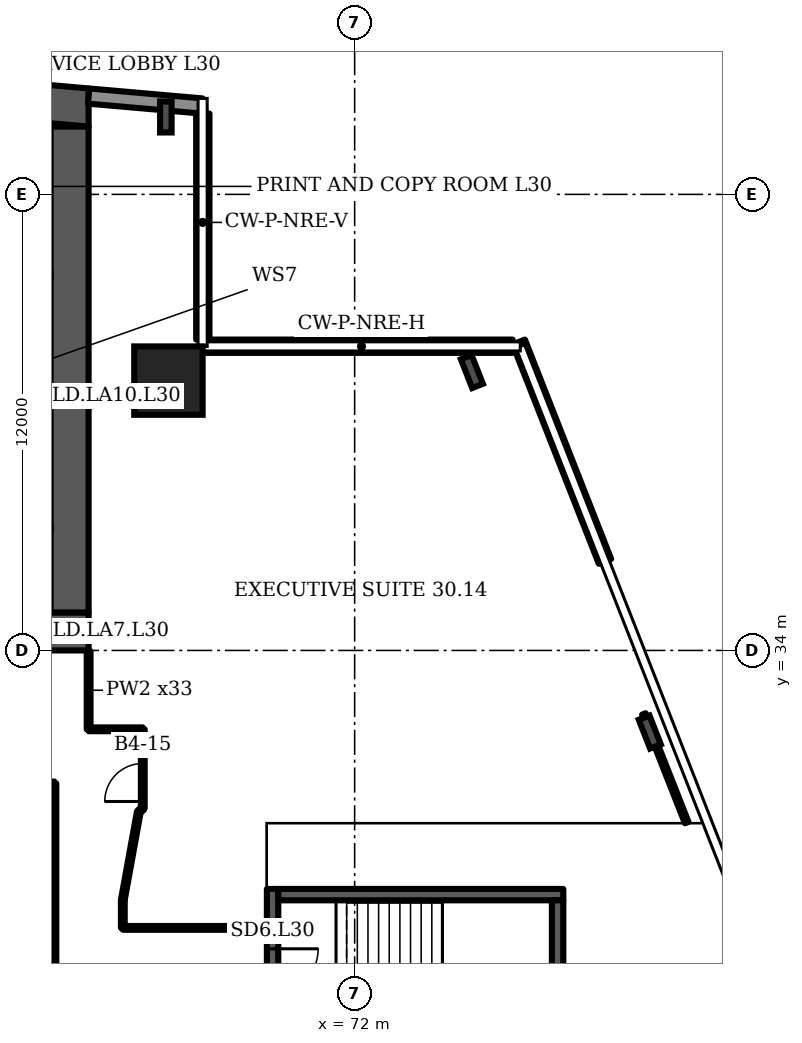
"""IFC4 building model, lengths in metres.
Left out: names, types, materials, properties, quantities, classifications, styles, units other than length and angle.
Written with IfcOpenShell. Run it as: python <this file> out.ifc"""

import sys

from ifc_helpers import new_model, si_unit, direction, frame, frame_2d, origin, origin_2d, place, context, subcontext, project, spatial, polyline, rectangle, i_section, outline, extrude, element, fill, save


model = new_model("IFC4")
c1 = context("Model", 3, precision=1e-05, world=origin(), true_north=direction((0.0, 1.0)))
c2 = subcontext(c1, "Body", "Model", "MODEL_VIEW")
j1 = project(units=[si_unit("LENGTHUNIT", "METRE"), si_unit("PLANEANGLEUNIT", "RADIAN")], contexts=[c1])
p1 = place(None, origin())
s1 = spatial("IfcSite", under=j1, at=p1, CompositionType="ELEMENT")
p2 = place(p1, origin())
s2 = spatial("IfcBuilding", under=s1, at=p2, CompositionType="ELEMENT")
p3 = place(p2, frame((0.0, 0.0, 129.1)))
s3 = spatial("IfcBuildingStorey", under=s2, at=p3, CompositionType="ELEMENT", Elevation=129.1)
p4 = place(p3, frame((0.0, 0.0, -0.0)))
e1 = element("IfcWall", 1, at=p4, inside=s3, PredefinedType="SHEAR", context=c2, shape_type="SweptSolid", body=[
    extrude(outline(polyline([(16.0, 47.784), (40.5, 49.927), (65.0, 47.784), (65.0, 48.787), (40.5, 50.931), (16.0, 48.787), (16.0, 47.784)])), origin(), (0.0, 0.0, 1.0), 3.6),
])
p5 = place(p3, frame((16.0, 34.5, 0.0), z_axis=(0.0, 0.0, 1.0), x_axis=(1.0, 0.0, 0.0)))
e2 = element("IfcWall", 2, at=p5, inside=s3, PredefinedType="SHEAR", context=c2, shape_type="SweptSolid", body=[
    extrude(rectangle(XDim=49.0, YDim=1.0, at=frame_2d((24.5, 0.0))), origin(), (0.0, 0.0, 1.0), 3.6),
])
p6 = place(p5, frame((1.2, 0.0, 0.0)))
e3 = element("IfcOpeningElement", 3, at=p6, cuts=e2, PredefinedType="OPENING", context=c2, shape_type="SweptSolid", body=[
    extrude(rectangle(XDim=1.1, YDim=2.1, at=frame_2d((0.55, 1.05))), frame((0.0, 0.51, 0.0), z_axis=(0.0, -1.0, 0.0), x_axis=(1.0, 0.0, 0.0)), (0.0, 0.0, 1.0), 1.02),
])
p7 = place(p5, frame((5.083, 0.0, 0.0)))
e4 = element("IfcOpeningElement", 4, at=p7, cuts=e2, PredefinedType="OPENING", context=c2, shape_type="SweptSolid", body=[
    extrude(rectangle(XDim=1.1, YDim=2.1, at=frame_2d((0.55, 1.05))), frame((0.0, 0.51, 0.0), z_axis=(0.0, -1.0, 0.0), x_axis=(1.0, 0.0, 0.0)), (0.0, 0.0, 1.0), 1.02),
])
p8 = place(p5, frame((2.933, 0.0, 0.0)))
e5 = element("IfcOpeningElement", 5, at=p8, cuts=e2, PredefinedType="OPENING", context=c2, shape_type="SweptSolid", body=[
    extrude(rectangle(XDim=1.4, YDim=2.1, at=frame_2d((0.7, 1.05))), frame((0.0, 0.51, 0.0), z_axis=(0.0, -1.0, 0.0), x_axis=(1.0, 0.0, 0.0)), (0.0, 0.0, 1.0), 1.02),
])
p9 = place(p5, frame((7.65, 0.0, 0.0)))
e6 = element("IfcOpeningElement", 6, at=p9, cuts=e2, PredefinedType="OPENING", context=c2, shape_type="SweptSolid", body=[
    extrude(rectangle(XDim=1.2, YDim=2.1, at=frame_2d((0.6, 1.05))), frame((0.0, 0.51, 0.0), z_axis=(0.0, -1.0, 0.0), x_axis=(1.0, 0.0, 0.0)), (0.0, 0.0, 1.0), 1.02),
])
p10 = place(p5, frame((14.817, 0.0, 0.0)))
e7 = element("IfcOpeningElement", 7, at=p10, cuts=e2, PredefinedType="OPENING", context=c2, shape_type="SweptSolid", body=[
    extrude(rectangle(XDim=1.1, YDim=2.1, at=frame_2d((0.55, 1.05))), frame((0.0, 0.51, 0.0), z_axis=(0.0, -1.0, 0.0), x_axis=(1.0, 0.0, 0.0)), (0.0, 0.0, 1.0), 1.02),
])
p11 = place(p5, frame((19.083, 0.0, 0.0)))
e8 = element("IfcOpeningElement", 8, at=p11, cuts=e2, PredefinedType="OPENING", context=c2, shape_type="SweptSolid", body=[
    extrude(rectangle(XDim=1.1, YDim=2.1, at=frame_2d((0.55, 1.05))), frame((0.0, 0.51, 0.0), z_axis=(0.0, -1.0, 0.0), x_axis=(1.0, 0.0, 0.0)), (0.0, 0.0, 1.0), 1.02),
])
p12 = place(p5, frame((16.8, 0.0, 0.0)))
e9 = element("IfcOpeningElement", 9, at=p12, cuts=e2, PredefinedType="OPENING", context=c2, shape_type="SweptSolid", body=[
    extrude(rectangle(XDim=1.4, YDim=2.1, at=frame_2d((0.7, 1.05))), frame((0.0, 0.51, 0.0), z_axis=(0.0, -1.0, 0.0), x_axis=(1.0, 0.0, 0.0)), (0.0, 0.0, 1.0), 1.02),
])
p13 = place(p5, frame((21.817, 0.0, 0.0)))
e10 = element("IfcOpeningElement", 10, at=p13, cuts=e2, PredefinedType="OPENING", context=c2, shape_type="SweptSolid", body=[
    extrude(rectangle(XDim=1.1, YDim=2.1, at=frame_2d((0.55, 1.05))), frame((0.0, 0.51, 0.0), z_axis=(0.0, -1.0, 0.0), x_axis=(1.0, 0.0, 0.0)), (0.0, 0.0, 1.0), 1.02),
])
p14 = place(p5, frame((26.083, 0.0, 0.0)))
e11 = element("IfcOpeningElement", 11, at=p14, cuts=e2, PredefinedType="OPENING", context=c2, shape_type="SweptSolid", body=[
    extrude(rectangle(XDim=1.1, YDim=2.1, at=frame_2d((0.55, 1.05))), frame((0.0, 0.51, 0.0), z_axis=(0.0, -1.0, 0.0), x_axis=(1.0, 0.0, 0.0)), (0.0, 0.0, 1.0), 1.02),
])
p15 = place(p5, frame((33.15, 0.0, 0.0)))
e12 = element("IfcOpeningElement", 12, at=p15, cuts=e2, PredefinedType="OPENING", context=c2, shape_type="SweptSolid", body=[
    extrude(rectangle(XDim=1.2, YDim=2.1, at=frame_2d((0.6, 1.05))), frame((0.0, 0.51, 0.0), z_axis=(0.0, -1.0, 0.0), x_axis=(1.0, 0.0, 0.0)), (0.0, 0.0, 1.0), 1.02),
])
p16 = place(p5, frame((37.8, 0.0, 0.0)))
e13 = element("IfcOpeningElement", 13, at=p16, cuts=e2, PredefinedType="OPENING", context=c2, shape_type="SweptSolid", body=[
    extrude(rectangle(XDim=1.4, YDim=2.1, at=frame_2d((0.7, 1.05))), frame((0.0, 0.51, 0.0), z_axis=(0.0, -1.0, 0.0), x_axis=(1.0, 0.0, 0.0)), (0.0, 0.0, 1.0), 1.02),
])
p17 = place(p5, frame((42.817, 0.0, 0.0)))
e14 = element("IfcOpeningElement", 14, at=p17, cuts=e2, PredefinedType="OPENING", context=c2, shape_type="SweptSolid", body=[
    extrude(rectangle(XDim=1.1, YDim=2.1, at=frame_2d((0.55, 1.05))), frame((0.0, 0.51, 0.0), z_axis=(0.0, -1.0, 0.0), x_axis=(1.0, 0.0, 0.0)), (0.0, 0.0, 1.0), 1.02),
])
p18 = place(p5, frame((46.7, 0.0, 0.0)))
e15 = element("IfcOpeningElement", 15, at=p18, cuts=e2, PredefinedType="OPENING", context=c2, shape_type="SweptSolid", body=[
    extrude(rectangle(XDim=1.1, YDim=2.1, at=frame_2d((0.55, 1.05))), frame((0.0, 0.51, 0.0), z_axis=(0.0, -1.0, 0.0), x_axis=(1.0, 0.0, 0.0)), (0.0, 0.0, 1.0), 1.02),
])
p19 = place(p5, frame((44.667, 0.0, 0.0)))
e16 = element("IfcOpeningElement", 16, at=p19, cuts=e2, PredefinedType="OPENING", context=c2, shape_type="SweptSolid", body=[
    extrude(rectangle(XDim=1.4, YDim=2.1, at=frame_2d((0.7, 1.05))), frame((0.0, 0.51, 0.0), z_axis=(0.0, -1.0, 0.0), x_axis=(1.0, 0.0, 0.0)), (0.0, 0.0, 1.0), 1.02),
])
p20 = place(p3, frame((64.5, 35.0, 0.0), z_axis=(0.0, 0.0, 1.0), x_axis=(0.0, 1.0, 0.0)))
e17 = element("IfcWall", 17, at=p20, inside=s3, PredefinedType="SHEAR", context=c2, shape_type="SweptSolid", body=[
    extrude(rectangle(XDim=12.784, YDim=1.0, at=frame_2d((6.392, 0.0))), origin(), (0.0, 0.0, 1.0), 3.6),
])
p21 = place(p3, frame((67.1, 41.1, 0.0), z_axis=(0.0, 0.0, 1.0), x_axis=(1.0, 0.0, 0.0)))
e18 = element("IfcColumn", 18, at=p21, inside=s3, PredefinedType="COLUMN", context=c2, shape_type="SweptSolid", body=[
    extrude(rectangle(XDim=1.8, YDim=1.8, at=origin_2d()), origin(), (0.0, 0.0, 1.0), 3.6),
])
for number, where, z_axis, x_axis in (
    (19, (79.766, 31.853, 0.0), (0.0, 0.0, 1.0), (0.931, 0.366, 0.0)),
    (20, (75.085, 41.338, 0.0), (0.0, 0.0, 1.0), (0.931, 0.366, 0.0)),
    (21, (67.032, 48.036, 0.0), (0.0, 0.0, 1.0), (1.0, 0.0, 0.0)),
):
    element("IfcColumn", number, at=place(p3, frame(where, z_axis=z_axis, x_axis=x_axis)), inside=s3, PredefinedType="COLUMN", context=c2, shape_type="SweptSolid", body=[
        extrude(i_section(OverallWidth=0.303, OverallDepth=0.814, WebThickness=0.021, FlangeThickness=0.04, FilletRadius=0.03, at=origin_2d()), origin(), (0.0, 0.0, 1.0), 3.6),
    ])
p22 = place(p3, frame((67.983, 48.326, 0.0), z_axis=(0.0, 0.0, 1.0), x_axis=(-0.996194, 0.087168, 0.0)))
e22 = element("IfcWall", 22, at=p22, inside=s3, PredefinedType="SOLIDWALL", context=c2, shape_type="SweptSolid", body=[
    extrude(rectangle(XDim=2.994, YDim=0.4, at=frame_2d((1.497, 0.0))), origin(), (0.0, 0.0, 1.0), 3.2),
])
p23 = place(p3, frame((78.586, 36.344, 0.0), z_axis=(0.0, 0.0, 1.0), x_axis=(-0.365792, 0.930699, 0.0)))
e23 = element("IfcWall", 23, at=p23, inside=s3, PredefinedType="SOLIDWALL", context=c2, shape_type="SweptSolid", body=[
    extrude(rectangle(XDim=6.202, YDim=0.35, at=frame_2d((3.101, 0.0))), origin(), (0.0, 0.0, 1.0), 1.0),
])
p24 = place(p3, frame((76.155, 42.005, 0.0), z_axis=(0.0, 0.0, 1.0), x_axis=(-1.0, 0.0, 0.0)))
e24 = element("IfcWall", 24, at=p24, inside=s3, PredefinedType="SOLIDWALL", context=c2, shape_type="SweptSolid", body=[
    extrude(rectangle(XDim=8.155, YDim=0.35, at=frame_2d((4.078, 0.0))), origin(), (0.0, 0.0, 1.0), 1.0),
])
p25 = place(p3, frame((68.005, 42.18, 0.0), z_axis=(0.0, 0.0, 1.0), x_axis=(0.0, 1.0, 0.0)))
e25 = element("IfcWall", 25, at=p25, inside=s3, PredefinedType="SOLIDWALL", context=c2, shape_type="SweptSolid", body=[
    extrude(rectangle(XDim=5.947, YDim=0.35, at=frame_2d((2.973, 0.0))), origin(), (0.0, 0.0, 1.0), 1.0),
])
p26 = place(p3, frame((69.84, 23.375, 0.0), z_axis=(0.0, 0.0, 1.0), x_axis=(0.0, 1.0, 0.0)))
e26 = element("IfcWall", 26, at=p26, inside=s3, PredefinedType="SHEAR", context=c2, shape_type="SweptSolid", body=[
    extrude(rectangle(XDim=4.35, YDim=0.3, at=frame_2d((2.175, 0.0))), origin(), (0.0, 0.0, 1.0), 3.2),
])
p27 = place(p26, frame((1.575, 0.0, 0.0)))
e27 = element("IfcOpeningElement", 27, at=p27, cuts=e26, PredefinedType="OPENING", context=c2, shape_type="SweptSolid", body=[
    extrude(rectangle(XDim=1.2, YDim=2.1, at=frame_2d((0.6, 1.05))), frame((0.0, 0.16, 0.0), z_axis=(0.0, -1.0, 0.0), x_axis=(1.0, 0.0, 0.0)), (0.0, 0.0, 1.0), 0.32),
])
p28 = place(p3, frame((44.51, 30.5, 0.0), z_axis=(0.0, 0.0, 1.0), x_axis=(1.0, 0.0, 0.0)))
e28 = element("IfcWall", 28, at=p28, inside=s3, PredefinedType="PARTITIONING", context=c2, shape_type="SweptSolid", body=[
    extrude(rectangle(XDim=19.59, YDim=0.1, at=frame_2d((9.795, 0.0))), origin(), (0.0, 0.0, 1.0), 3.2),
])
p29 = place(p28, frame((6.41, 0.0, 0.0)))
e29 = element("IfcOpeningElement", 29, at=p29, cuts=e28, PredefinedType="OPENING", context=c2, shape_type="SweptSolid", body=[
    extrude(rectangle(XDim=1.0, YDim=2.1, at=frame_2d((0.5, 1.05))), frame((0.0, 0.06, 0.0), z_axis=(0.0, -1.0, 0.0), x_axis=(1.0, 0.0, 0.0)), (0.0, 0.0, 1.0), 0.12),
])
p30 = place(p28, frame((10.41, 0.0, 0.0)))
e30 = element("IfcOpeningElement", 30, at=p30, cuts=e28, PredefinedType="OPENING", context=c2, shape_type="SweptSolid", body=[
    extrude(rectangle(XDim=1.0, YDim=2.1, at=frame_2d((0.5, 1.05))), frame((0.0, 0.06, 0.0), z_axis=(0.0, -1.0, 0.0), x_axis=(1.0, 0.0, 0.0)), (0.0, 0.0, 1.0), 0.12),
])
p31 = place(p3, frame((64.1, 10.095, 0.0), z_axis=(0.0, 0.0, 1.0), x_axis=(0.0, 1.0, 0.0)))
e31 = element("IfcWall", 31, at=p31, inside=s3, PredefinedType="PARTITIONING", context=c2, shape_type="SweptSolid", body=[
    extrude(rectangle(XDim=20.405, YDim=0.1, at=frame_2d((10.203, 0.0))), origin(), (0.0, 0.0, 1.0), 3.2),
])
p32 = place(p31, frame((8.905, 0.0, 0.0)))
e32 = element("IfcOpeningElement", 32, at=p32, cuts=e31, PredefinedType="OPENING", context=c2, shape_type="SweptSolid", body=[
    extrude(rectangle(XDim=1.0, YDim=2.1, at=frame_2d((0.5, 1.05))), frame((0.0, 0.06, 0.0), z_axis=(0.0, -1.0, 0.0), x_axis=(1.0, 0.0, 0.0)), (0.0, 0.0, 1.0), 0.12),
])
p33 = place(p3, frame((65.0, 31.925, 0.0), z_axis=(0.0, 0.0, 1.0), x_axis=(0.0, 1.0, 0.0)))
e33 = element("IfcWall", 33, at=p33, inside=s3, PredefinedType="PARTITIONING", context=c2, shape_type="SweptSolid", body=[
    extrude(rectangle(XDim=2.055, YDim=0.1, at=frame_2d((1.027, 0.0))), origin(), (0.0, 0.0, 1.0), 3.2),
])
p34 = place(p3, frame((65.0, 31.925, 0.0), z_axis=(0.0, 0.0, 1.0), x_axis=(1.0, 0.0, 0.0)))
e34 = element("IfcWall", 34, at=p34, inside=s3, PredefinedType="PARTITIONING", context=c2, shape_type="SweptSolid", body=[
    extrude(rectangle(XDim=1.425, YDim=0.1, at=frame_2d((0.712, 0.0))), origin(), (0.0, 0.0, 1.0), 3.2),
])
p35 = place(p3, frame((65.9, 26.7, 0.0), z_axis=(0.0, 0.0, 1.0), x_axis=(0.0, 1.0, 0.0)))
e35 = element("IfcWall", 35, at=p35, inside=s3, PredefinedType="PARTITIONING", context=c2, shape_type="SweptSolid", body=[
    extrude(rectangle(XDim=0.735, YDim=0.1, at=frame_2d((0.368, 0.0))), origin(), (0.0, 0.0, 1.0), 3.2),
])
p36 = place(p3, frame((65.9, 26.7, 0.0), z_axis=(0.0, 0.0, 1.0), x_axis=(1.0, 0.0, 0.0)))
e36 = element("IfcWall", 36, at=p36, inside=s3, PredefinedType="PARTITIONING", context=c2, shape_type="SweptSolid", body=[
    extrude(rectangle(XDim=3.771, YDim=0.1, at=frame_2d((1.885, 0.0))), origin(), (0.0, 0.0, 1.0), 3.2),
])
p37 = place(p3, frame((65.9, 27.435, 0.0), z_axis=(0.0, 0.0, 1.0), x_axis=(0.178584, 0.983924, 0.0)))
e37 = element("IfcWall", 37, at=p37, inside=s3, PredefinedType="PARTITIONING", context=c2, shape_type="SweptSolid", body=[
    extrude(rectangle(XDim=2.353, YDim=0.1, at=frame_2d((1.176, 0.0))), origin(), (0.0, 0.0, 1.0), 3.2),
])
p38 = place(p3, frame((66.32, 29.75, 0.0), z_axis=(0.0, 0.0, 1.0), x_axis=(0.741581, 0.670872, 0.0)))
e38 = element("IfcWall", 38, at=p38, inside=s3, PredefinedType="PARTITIONING", context=c2, shape_type="SweptSolid", body=[
    extrude(rectangle(XDim=0.142, YDim=0.1, at=frame_2d((0.071, 0.0))), origin(), (0.0, 0.0, 1.0), 3.2),
])
p39 = place(p3, frame((66.425, 29.845, 0.0), z_axis=(0.0, 0.0, 1.0), x_axis=(0.0, 1.0, 0.0)))
e39 = element("IfcWall", 39, at=p39, inside=s3, PredefinedType="PARTITIONING", context=c2, shape_type="SweptSolid", body=[
    extrude(rectangle(XDim=2.08, YDim=0.1, at=frame_2d((1.04, 0.0))), origin(), (0.0, 0.0, 1.0), 3.2),
])
p40 = place(p39, frame((0.181, 0.0, 0.0)))
e40 = element("IfcOpeningElement", 40, at=p40, cuts=e39, PredefinedType="OPENING", context=c2, shape_type="SweptSolid", body=[
    extrude(rectangle(XDim=1.0, YDim=2.1, at=frame_2d((0.5, 1.05))), frame((0.0, 0.06, 0.0), z_axis=(0.0, -1.0, 0.0), x_axis=(1.0, 0.0, 0.0)), (0.0, 0.0, 1.0), 0.12),
])
p41 = place(p3, frame((80.737, 29.47, 0.0), z_axis=(0.0, 0.0, 1.0), x_axis=(-0.366592, 0.930378, 0.0)))
e41 = element("IfcWall", 41, at=p41, inside=s3, PredefinedType="PARTITIONING", context=c2, shape_type="SweptSolid", body=[
    extrude(rectangle(XDim=3.074, YDim=0.1, at=frame_2d((1.537, 0.0))), origin(), (0.0, 0.0, 1.0), 2.58),
])
p42 = place(p3, frame((69.99, 27.575, 0.0), z_axis=(0.0, 0.0, 1.0), x_axis=(1.0, 0.0, 0.0)))
e42 = element("IfcWall", 42, at=p42, inside=s3, PredefinedType="SHEAR", context=c2, shape_type="SweptSolid", body=[
    extrude(rectangle(XDim=7.5, YDim=0.3, at=frame_2d((3.75, 0.0))), origin(), (0.0, 0.0, 1.0), 3.2),
])
p43 = place(p3, frame((77.34, 23.675, 0.0), z_axis=(0.0, 0.0, 1.0), x_axis=(0.0, 1.0, 0.0)))
e43 = element("IfcWall", 43, at=p43, inside=s3, PredefinedType="SHEAR", context=c2, shape_type="SweptSolid", body=[
    extrude(rectangle(XDim=3.75, YDim=0.3, at=frame_2d((1.875, 0.0))), origin(), (0.0, 0.0, 1.0), 3.2),
])
p44 = place(p27, origin())
e44 = element("IfcDoor", 44, at=p44, inside=s3, OperationType="SINGLE_SWING_RIGHT", PredefinedType="DOOR", context=c2, shape_type="SweptSolid", body=[
    extrude(rectangle(XDim=1.2, YDim=2.1, at=frame_2d((0.6, 1.05))), frame((0.0, 0.025, 0.0), z_axis=(0.0, -1.0, 0.0), x_axis=(1.0, 0.0, 0.0)), (0.0, 0.0, 1.0), 0.05),
])
fill(e27, e44)
p45 = place(p40, origin())
e45 = element("IfcDoor", 45, at=p45, inside=s3, OperationType="SINGLE_SWING_LEFT", PredefinedType="DOOR", context=c2, shape_type="SweptSolid", body=[
    extrude(rectangle(XDim=1.0, YDim=2.1, at=frame_2d((0.5, 1.05))), frame((0.0, 0.025, 0.0), z_axis=(0.0, -1.0, 0.0), x_axis=(1.0, 0.0, 0.0)), (0.0, 0.0, 1.0), 0.05),
])
fill(e40, e45)
save(model, sys.argv[1])
